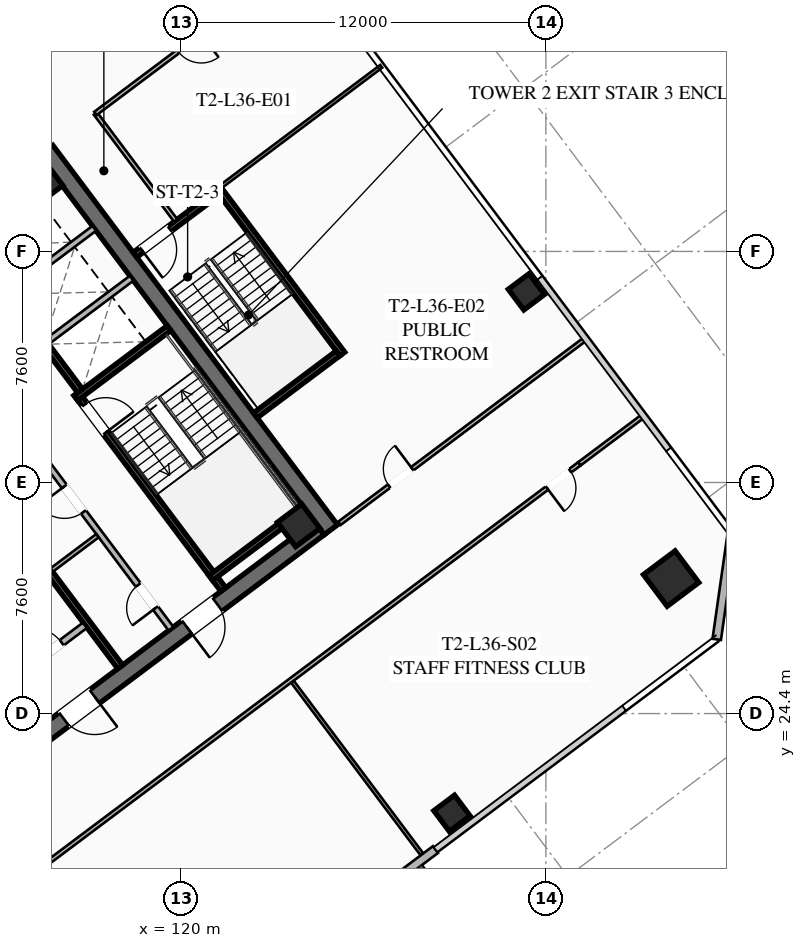
"""IFC4 building model, lengths in metres.
Left out: names, types, materials, properties, quantities, classifications, styles, units other than length and angle.
Written with IfcOpenShell. Run it as: python <this file> out.ifc"""

import sys

from ifc_helpers import new_model, si_unit, direction, frame, frame_2d, origin, origin_2d, place, context, subcontext, project, spatial, rectangle, hollow_rectangle, extrude, element, fill, save


model = new_model("IFC4")
c1 = context("Model", 3, precision=1e-05, world=origin(), true_north=direction((0.0, 1.0)))
c2 = subcontext(c1, "Body", "Model", "MODEL_VIEW")
j1 = project(units=[si_unit("LENGTHUNIT", "METRE"), si_unit("PLANEANGLEUNIT", "RADIAN")], contexts=[c1])
p1 = place(None, origin())
s1 = spatial("IfcSite", under=j1, at=p1, CompositionType="ELEMENT")
p2 = place(p1, origin())
s2 = spatial("IfcBuilding", under=s1, at=p2, CompositionType="ELEMENT")
p3 = place(p2, frame((0.0, 0.0, 135.7)))
s3 = spatial("IfcBuildingStorey", under=s2, at=p3, CompositionType="ELEMENT", Elevation=135.7)
p4 = place(p3, frame((115.564, 42.923, 0.0), z_axis=(0.0, 0.0, 1.0), x_axis=(0.600005007985, -0.799996243986, 0.0)))
e1 = element("IfcWall", 1, at=p4, inside=s3, PredefinedType="SHEAR", context=c2, shape_type="SweptSolid", body=[
    extrude(rectangle(XDim=15.6, YDim=0.55, at=frame_2d((7.8, 0.0))), origin(), (0.0, 0.0, 1.0), 3.55),
])
p5 = place(p3, frame((124.539, 30.498, 0.0), z_axis=(0.0, 0.0, 1.0), x_axis=(-0.799998054672, -0.600002593761, 0.0)))
e2 = element("IfcWall", 2, at=p5, inside=s3, PredefinedType="SHEAR", context=c2, shape_type="SweptSolid", body=[
    extrude(rectangle(XDim=15.06, YDim=0.55, at=frame_2d((7.53, 0.0))), origin(), (0.0, 0.0, 1.0), 3.55),
])
p6 = place(p5, frame((9.23, 0.0, 0.0)))
e3 = element("IfcOpeningElement", 3, at=p6, cuts=e2, PredefinedType="OPENING", context=c2, shape_type="SweptSolid", body=[
    extrude(rectangle(XDim=1.25, YDim=2.25, at=frame_2d((0.625, 1.125))), frame((0.0, 0.285, 0.0), z_axis=(0.0, -1.0, 0.0), x_axis=(1.0, 0.0, 0.0)), (0.0, 0.0, 1.0), 0.57),
])
p7 = place(p5, frame((4.18, 0.0, 0.0)))
e4 = element("IfcOpeningElement", 4, at=p7, cuts=e2, PredefinedType="OPENING", context=c2, shape_type="SweptSolid", body=[
    extrude(rectangle(XDim=1.25, YDim=2.25, at=frame_2d((0.625, 1.125))), frame((0.0, 0.285, 0.0), z_axis=(0.0, -1.0, 0.0), x_axis=(1.0, 0.0, 0.0)), (0.0, 0.0, 1.0), 0.57),
])
for number, where, z_axis, x_axis in (
    (5, (123.87, 30.59, 0.0), (0.0, 0.0, 1.0), (0.8, 0.6, 0.0)),
    (6, (115.41, 41.87, 0.0), (0.0, 0.0, 1.0), (0.8, 0.6, 0.0)),
):
    element("IfcColumn", number, at=place(p3, frame(where, z_axis=z_axis, x_axis=x_axis)), inside=s3, PredefinedType="COLUMN", context=c2, shape_type="SweptSolid", body=[
        extrude(hollow_rectangle(XDim=1.0, YDim=1.0, WallThickness=0.04, at=origin_2d()), origin(), (0.0, 0.0, 1.0), 3.37),
    ])
p8 = place(p3, frame((136.12, 28.84, 0.0), z_axis=(0.0, 0.0, 1.0), x_axis=(0.799999996291, 0.600000004945, 0.0)))
e7 = element("IfcColumn", 7, at=p8, inside=s3, PredefinedType="COLUMN", context=c2, shape_type="SweptSolid", body=[
    extrude(hollow_rectangle(XDim=1.3, YDim=1.3, WallThickness=0.05, at=origin_2d()), origin(), (0.0, 0.0, 1.0), 3.37),
])
for number, where, z_axis, x_axis in (
    (8, (128.91, 21.12, 0.0), (0.0, 0.0, 1.0), (0.8, 0.6, 0.0)),
    (9, (131.36, 38.27, 0.0), (0.0, 0.0, 1.0), (0.8, 0.6, 0.0)),
):
    element("IfcColumn", number, at=place(p3, frame(where, z_axis=z_axis, x_axis=x_axis)), inside=s3, PredefinedType="COLUMN", context=c2, shape_type="SweptSolid", body=[
        extrude(hollow_rectangle(XDim=0.85, YDim=0.85, WallThickness=0.035, at=origin_2d()), origin(), (0.0, 0.0, 1.0), 3.37),
    ])
p9 = place(p3, frame((128.368, 19.926, 0.0), z_axis=(0.0, 0.0, 1.0), x_axis=(-0.799986212866, -0.600018382406, 0.0)))
e10 = element("IfcWall", 10, at=p9, inside=s3, PredefinedType="SOLIDWALL", context=c2, shape_type="SweptSolid", body=[
    extrude(rectangle(XDim=8.5, YDim=0.28, at=frame_2d((4.25, 0.0))), origin(), (0.0, 0.0, 1.0), 3.37),
])
p10 = place(p9, frame((3.6, 0.0, 0.0)))
e11 = element("IfcOpeningElement", 11, at=p10, cuts=e10, PredefinedType="OPENING", context=c2, shape_type="SweptSolid", body=[
    extrude(rectangle(XDim=1.3, YDim=2.15, at=frame_2d((0.65, 1.075))), frame((0.0, 0.15, 0.0), z_axis=(0.0, -1.0, 0.0), x_axis=(1.0, 0.0, 0.0)), (0.0, 0.0, 1.0), 0.3),
])
p11 = place(p9, frame((1.46, 0.0, 0.85)))
e12 = element("IfcOpeningElement", 12, at=p11, cuts=e10, PredefinedType="OPENING", context=c2, shape_type="SweptSolid", body=[
    extrude(rectangle(XDim=1.8, YDim=1.92, at=frame_2d((0.9, 0.96))), frame((0.0, 0.15, 0.0), z_axis=(0.0, -1.0, 0.0), x_axis=(1.0, 0.0, 0.0)), (0.0, 0.0, 1.0), 0.3),
])
p12 = place(p3, frame((138.12, 30.34, 0.0), z_axis=(0.0, 0.0, 1.0), x_axis=(-0.141421356237, -0.989949493661, 0.0)))
e13 = element("IfcWall", 13, at=p12, inside=s3, PredefinedType="SOLIDWALL", context=c2, shape_type="SweptSolid", body=[
    extrude(rectangle(XDim=3.536, YDim=0.28, at=frame_2d((1.768, 0.0))), origin(), (0.0, 0.0, 1.0), 3.37),
])
p13 = place(p3, frame((116.56, 34.92, 0.0), z_axis=(0.0, 0.0, 1.0), x_axis=(0.59999029481, -0.8000072788, 0.0)))
e14 = element("IfcWall", 14, at=p13, inside=s3, PredefinedType="SHEAR", context=c2, shape_type="SweptSolid", body=[
    extrude(rectangle(XDim=8.05, YDim=0.2, at=frame_2d((4.025, 0.0))), origin(), (0.0, 0.0, 1.0), 3.37),
])
p14 = place(p13, frame((0.45, 0.0, 0.0)))
e15 = element("IfcOpeningElement", 15, at=p14, cuts=e14, PredefinedType="OPENING", context=c2, shape_type="SweptSolid", body=[
    extrude(rectangle(XDim=1.15, YDim=2.2, at=frame_2d((0.575, 1.1))), frame((0.0, 0.11, 0.0), z_axis=(0.0, -1.0, 0.0), x_axis=(1.0, 0.0, 0.0)), (0.0, 0.0, 1.0), 0.22),
])
for number, where, z_axis, x_axis in (
    (16, (116.54, 34.78, 0.0), (0.0, 0.0, 1.0), (0.8, 0.6, 0.0)),
    (17, (120.98, 28.86, 0.0), (0.0, 0.0, 1.0), (0.8, 0.6, 0.0)),
):
    element("IfcWall", number, at=place(p3, frame(where, z_axis=z_axis, x_axis=x_axis)), inside=s3, PredefinedType="SHEAR", context=c2, shape_type="SweptSolid", body=[
        extrude(rectangle(XDim=3.83, YDim=0.2, at=frame_2d((1.915, 0.0))), origin(), (0.0, 0.0, 1.0), 3.37),
    ])
p15 = place(p3, frame((117.998, 25.936, 0.0), z_axis=(0.0, 0.0, 1.0), x_axis=(-0.600002693989, 0.799997979501, 0.0)))
e18 = element("IfcWall", 18, at=p15, inside=s3, PredefinedType="SHEAR", context=c2, shape_type="SweptSolid", body=[
    extrude(rectangle(XDim=14.5, YDim=0.2, at=frame_2d((7.25, 0.0))), origin(), (0.0, 0.0, 1.0), 3.37),
])
p16 = place(p3, frame((114.316, 25.412, 0.0), z_axis=(0.0, 0.0, 1.0), x_axis=(0.800018601094, 0.59997519774, 0.0)))
e19 = element("IfcWall", 19, at=p16, inside=s3, PredefinedType="SOLIDWALL", context=c2, shape_type="SweptSolid", body=[
    extrude(rectangle(XDim=3.15, YDim=0.22, at=frame_2d((1.575, 0.0))), origin(), (0.0, 0.0, 1.0), 2.723),
])
p17 = place(p16, frame((0.95, 0.0, 0.0)))
e20 = element("IfcOpeningElement", 20, at=p17, cuts=e19, PredefinedType="OPENING", context=c2, shape_type="SweptSolid", body=[
    extrude(rectangle(XDim=1.25, YDim=2.25, at=frame_2d((0.625, 1.125))), frame((0.0, 0.12, 0.0), z_axis=(0.0, -1.0, 0.0), x_axis=(1.0, 0.0, 0.0)), (0.0, 0.0, 1.0), 0.24),
])
p18 = place(p3, frame((112.81, 40.17, 0.0), z_axis=(0.0, 0.0, 1.0), x_axis=(0.599993943644, -0.800004542231, 0.0)))
e21 = element("IfcWall", 21, at=p18, inside=s3, PredefinedType="SHEAR", context=c2, shape_type="SweptSolid", body=[
    extrude(rectangle(XDim=6.45, YDim=0.2, at=frame_2d((3.225, 0.0))), origin(), (0.0, 0.0, 1.0), 3.37),
])
for number, where, z_axis, x_axis in (
    (22, (115.59, 36.63, 0.0), (0.0, 0.0, 1.0), (0.8, 0.6, 0.0)),
    (23, (114.36, 38.27, 0.0), (0.0, 0.0, 1.0), (0.8, 0.6, 0.0)),
):
    element("IfcWall", number, at=place(p3, frame(where, z_axis=z_axis, x_axis=x_axis)), inside=s3, PredefinedType="SOLIDWALL", context=c2, shape_type="SweptSolid", body=[
        extrude(rectangle(XDim=3.48, YDim=0.2, at=frame_2d((1.74, 0.0))), origin(), (0.0, 0.0, 1.0), 3.37),
    ])
p19 = place(p3, frame((119.67, 27.19, 0.0), z_axis=(0.0, 0.0, 1.0), x_axis=(-0.599988677396, 0.800008491828, 0.0)))
e24 = element("IfcWall", 24, at=p19, inside=s3, PredefinedType="SOLIDWALL", context=c2, shape_type="SweptSolid", body=[
    extrude(rectangle(XDim=6.9, YDim=0.2, at=frame_2d((3.45, 0.0))), origin(), (0.0, 0.0, 1.0), 2.723),
])
p20 = place(p19, frame((0.85, 0.0, 0.0)))
e25 = element("IfcOpeningElement", 25, at=p20, cuts=e24, PredefinedType="OPENING", context=c2, shape_type="SweptSolid", body=[
    extrude(rectangle(XDim=0.95, YDim=2.05, at=frame_2d((0.475, 1.025))), frame((0.0, 0.11, 0.0), z_axis=(0.0, -1.0, 0.0), x_axis=(1.0, 0.0, 0.0)), (0.0, 0.0, 1.0), 0.22),
])
p21 = place(p19, frame((4.8, 0.0, 0.0)))
e26 = element("IfcOpeningElement", 26, at=p21, cuts=e24, PredefinedType="OPENING", context=c2, shape_type="SweptSolid", body=[
    extrude(rectangle(XDim=1.05, YDim=2.2, at=frame_2d((0.525, 1.1))), frame((0.0, 0.11, 0.0), z_axis=(0.0, -1.0, 0.0), x_axis=(1.0, 0.0, 0.0)), (0.0, 0.0, 1.0), 0.22),
])
p22 = place(p3, frame((115.746, 29.122, 0.0), z_axis=(0.0, 0.0, 1.0), x_axis=(0.8, 0.6, 0.0)))
e27 = element("IfcWall", 27, at=p22, inside=s3, PredefinedType="PARTITIONING", context=c2, shape_type="SweptSolid", body=[
    extrude(rectangle(XDim=1.88, YDim=0.135, at=frame_2d((0.94, 0.0))), origin(), (0.0, 0.0, 1.0), 2.723),
])
p23 = place(p3, frame((125.304, 36.228, 0.0), z_axis=(0.0, 0.0, 1.0), x_axis=(-0.59998851072, 0.800008616831, 0.0)))
e28 = element("IfcWall", 28, at=p23, inside=s3, PredefinedType="SHEAR", context=c2, shape_type="SweptSolid", body=[
    extrude(rectangle(XDim=6.8, YDim=0.2, at=frame_2d((3.4, 0.0))), origin(), (0.0, 0.0, 1.0), 3.37),
])
p24 = place(p3, frame((121.204, 41.528, 0.0), z_axis=(0.0, 0.0, 1.0), x_axis=(-0.800017232136, -0.599977023131, 0.0)))
e29 = element("IfcWall", 29, at=p24, inside=s3, PredefinedType="SHEAR", context=c2, shape_type="SweptSolid", body=[
    extrude(rectangle(XDim=3.4, YDim=0.2, at=frame_2d((1.7, 0.0))), origin(), (0.0, 0.0, 1.0), 3.37),
])
p25 = place(p24, frame((1.975, 0.0, 0.0)))
e30 = element("IfcOpeningElement", 30, at=p25, cuts=e29, PredefinedType="OPENING", context=c2, shape_type="SweptSolid", body=[
    extrude(rectangle(XDim=1.15, YDim=2.2, at=frame_2d((0.575, 1.1))), frame((0.0, 0.11, 0.0), z_axis=(0.0, -1.0, 0.0), x_axis=(1.0, 0.0, 0.0)), (0.0, 0.0, 1.0), 0.22),
])
p26 = place(p3, frame((122.444, 34.208, 0.0), z_axis=(0.0, 0.0, 1.0), x_axis=(0.79999138319, 0.600011488909, 0.0)))
e31 = element("IfcWall", 31, at=p26, inside=s3, PredefinedType="SHEAR", context=c2, shape_type="SweptSolid", body=[
    extrude(rectangle(XDim=3.4, YDim=0.2, at=frame_2d((1.7, 0.0))), origin(), (0.0, 0.0, 1.0), 3.37),
])
p27 = place(p3, frame((119.824, 40.618, 0.0), z_axis=(0.0, 0.0, 1.0), x_axis=(-0.599982243973, 0.800013316712, 0.0)))
e32 = element("IfcWall", 32, at=p27, inside=s3, PredefinedType="PARTITIONING", context=c2, shape_type="SweptSolid", body=[
    extrude(rectangle(XDim=4.4, YDim=0.135, at=frame_2d((2.2, 0.0))), origin(), (0.0, 0.0, 1.0), 2.723),
])
p28 = place(p3, frame((94.79, 31.53, 0.0), z_axis=(0.0, 0.0, 1.0), x_axis=(0.8, 0.6, 0.0)))
e33 = element("IfcWall", 33, at=p28, inside=s3, PredefinedType="PARTITIONING", context=c2, shape_type="SweptSolid", body=[
    extrude(rectangle(XDim=31.3, YDim=0.135, at=frame_2d((15.65, 0.0))), origin(), (0.0, 0.0, 1.0), 2.723),
])
p29 = place(p28, frame((0.3, 0.0, 0.0)))
e34 = element("IfcOpeningElement", 34, at=p29, cuts=e33, PredefinedType="OPENING", context=c2, shape_type="SweptSolid", body=[
    extrude(rectangle(XDim=0.95, YDim=2.05, at=frame_2d((0.475, 1.025))), frame((0.0, 0.077, 0.0), z_axis=(0.0, -1.0, 0.0), x_axis=(1.0, 0.0, 0.0)), (0.0, 0.0, 1.0), 0.155),
])
p30 = place(p28, frame((15.263, 0.0, 0.0)))
e35 = element("IfcOpeningElement", 35, at=p30, cuts=e33, PredefinedType="OPENING", context=c2, shape_type="SweptSolid", body=[
    extrude(rectangle(XDim=0.95, YDim=2.05, at=frame_2d((0.475, 1.025))), frame((0.0, 0.077, 0.0), z_axis=(0.0, -1.0, 0.0), x_axis=(1.0, 0.0, 0.0)), (0.0, 0.0, 1.0), 0.155),
])
p31 = place(p28, frame((30.05, 0.0, 0.0)))
e36 = element("IfcOpeningElement", 36, at=p31, cuts=e33, PredefinedType="OPENING", context=c2, shape_type="SweptSolid", body=[
    extrude(rectangle(XDim=0.95, YDim=2.05, at=frame_2d((0.475, 1.025))), frame((0.0, 0.077, 0.0), z_axis=(0.0, -1.0, 0.0), x_axis=(1.0, 0.0, 0.0)), (0.0, 0.0, 1.0), 0.155),
])
p32 = place(p3, frame((133.102, 32.614, 0.0), z_axis=(0.0, 0.0, 1.0), x_axis=(-0.8, -0.6, 0.0)))
e37 = element("IfcWall", 37, at=p32, inside=s3, PredefinedType="PARTITIONING", context=c2, shape_type="SweptSolid", body=[
    extrude(rectangle(XDim=31.3, YDim=0.135, at=frame_2d((15.65, 0.0))), origin(), (0.0, 0.0, 1.0), 2.723),
])
p33 = place(p32, frame((29.97, 0.0, 0.0)))
e38 = element("IfcOpeningElement", 38, at=p33, cuts=e37, PredefinedType="OPENING", context=c2, shape_type="SweptSolid", body=[
    extrude(rectangle(XDim=0.95, YDim=2.05, at=frame_2d((0.475, 1.025))), frame((0.0, 0.077, 0.0), z_axis=(0.0, -1.0, 0.0), x_axis=(1.0, 0.0, 0.0)), (0.0, 0.0, 1.0), 0.155),
])
p34 = place(p32, frame((0.38, 0.0, 0.0)))
e39 = element("IfcOpeningElement", 39, at=p34, cuts=e37, PredefinedType="OPENING", context=c2, shape_type="SweptSolid", body=[
    extrude(rectangle(XDim=0.95, YDim=2.05, at=frame_2d((0.475, 1.025))), frame((0.0, 0.077, 0.0), z_axis=(0.0, -1.0, 0.0), x_axis=(1.0, 0.0, 0.0)), (0.0, 0.0, 1.0), 0.155),
])
p35 = place(p3, frame((133.102, 32.614, 0.0), z_axis=(0.0, 0.0, 1.0), x_axis=(0.80002227902, 0.599970293491, 0.0)))
e40 = element("IfcWall", 40, at=p35, inside=s3, PredefinedType="PARTITIONING", context=c2, shape_type="SweptSolid", body=[
    extrude(rectangle(XDim=2.63, YDim=0.135, at=frame_2d((1.315, 0.0))), origin(), (0.0, 0.0, 1.0), 2.723),
])
p36 = place(p3, frame((127.918, 19.776, 0.0), z_axis=(0.0, 0.0, 1.0), x_axis=(-0.6, 0.8, 0.0)))
e41 = element("IfcWall", 41, at=p36, inside=s3, PredefinedType="PARTITIONING", context=c2, shape_type="SweptSolid", body=[
    extrude(rectangle(XDim=7.08, YDim=0.11, at=frame_2d((3.54, 0.0))), origin(), (0.0, 0.0, 1.0), 2.723),
])
p37 = place(p3, frame((123.944, 49.208, 0.0), z_axis=(0.0, 0.0, 1.0), x_axis=(-0.799996532921, -0.600004622744, 0.0)))
e42 = element("IfcWall", 42, at=p37, inside=s3, PredefinedType="PARTITIONING", context=c2, shape_type="SweptSolid", body=[
    extrude(rectangle(XDim=8.45, YDim=0.135, at=frame_2d((4.225, 0.0))), origin(), (0.0, 0.0, 1.0), 2.723),
])
p38 = place(p37, frame((4.1, 0.0, 0.0)))
e43 = element("IfcOpeningElement", 43, at=p38, cuts=e42, PredefinedType="OPENING", context=c2, shape_type="SweptSolid", body=[
    extrude(rectangle(XDim=0.95, YDim=2.05, at=frame_2d((0.475, 1.025))), frame((0.0, 0.077, 0.0), z_axis=(0.0, -1.0, 0.0), x_axis=(1.0, 0.0, 0.0)), (0.0, 0.0, 1.0), 0.155),
])
p39 = place(p3, frame((125.208, 30.656, 0.0), z_axis=(0.0, 0.0, 1.0), x_axis=(0.799997105034, 0.600003859935, 0.0)))
e44 = element("IfcWall", 44, at=p39, inside=s3, PredefinedType="PARTITIONING", context=c2, shape_type="SweptSolid", body=[
    extrude(rectangle(XDim=10.12, YDim=0.135, at=frame_2d((5.06, 0.0))), origin(), (0.0, 0.0, 1.0), 2.723),
])
p40 = place(p39, frame((2.045, 0.0, 0.0)))
e45 = element("IfcOpeningElement", 45, at=p40, cuts=e44, PredefinedType="OPENING", context=c2, shape_type="SweptSolid", body=[
    extrude(rectangle(XDim=0.95, YDim=2.05, at=frame_2d((0.475, 1.025))), frame((0.0, 0.077, 0.0), z_axis=(0.0, -1.0, 0.0), x_axis=(1.0, 0.0, 0.0)), (0.0, 0.0, 1.0), 0.155),
])
p41 = place(p3, frame((126.584, 45.688, 0.0), z_axis=(0.0, 0.0, 1.0), x_axis=(-0.800004438899, -0.599994081423, 0.0)))
e46 = element("IfcWall", 46, at=p41, inside=s3, PredefinedType="PARTITIONING", context=c2, shape_type="SweptSolid", body=[
    extrude(rectangle(XDim=6.6, YDim=0.11, at=frame_2d((3.3, 0.0))), origin(), (0.0, 0.0, 1.0), 2.723),
])
p42 = place(p6, origin())
e47 = element("IfcDoor", 47, at=p42, inside=s3, OperationType="SINGLE_SWING_LEFT", PredefinedType="DOOR", context=c2, shape_type="SweptSolid", body=[
    extrude(rectangle(XDim=1.25, YDim=2.25, at=frame_2d((0.625, 1.125))), frame((0.0, 0.025, 0.0), z_axis=(0.0, -1.0, 0.0), x_axis=(1.0, 0.0, 0.0)), (0.0, 0.0, 1.0), 0.05),
])
fill(e3, e47)
p43 = place(p7, origin())
e48 = element("IfcDoor", 48, at=p43, inside=s3, OperationType="SINGLE_SWING_RIGHT", PredefinedType="DOOR", context=c2, shape_type="SweptSolid", body=[
    extrude(rectangle(XDim=1.25, YDim=2.25, at=frame_2d((0.625, 1.125))), frame((0.0, 0.025, 0.0), z_axis=(0.0, -1.0, 0.0), x_axis=(1.0, 0.0, 0.0)), (0.0, 0.0, 1.0), 0.05),
])
fill(e4, e48)
p44 = place(p14, origin())
e49 = element("IfcDoor", 49, at=p44, inside=s3, OperationType="SINGLE_SWING_RIGHT", PredefinedType="DOOR", context=c2, shape_type="SweptSolid", body=[
    extrude(rectangle(XDim=1.15, YDim=2.2, at=frame_2d((0.575, 1.1))), frame((0.0, 0.025, 0.0), z_axis=(0.0, -1.0, 0.0), x_axis=(1.0, 0.0, 0.0)), (0.0, 0.0, 1.0), 0.05),
])
fill(e15, e49)
p45 = place(p17, origin())
e50 = element("IfcDoor", 50, at=p45, inside=s3, OperationType="SINGLE_SWING_LEFT", PredefinedType="DOOR", context=c2, shape_type="SweptSolid", body=[
    extrude(rectangle(XDim=1.25, YDim=2.25, at=frame_2d((0.625, 1.125))), frame((0.0, 0.025, 0.0), z_axis=(0.0, -1.0, 0.0), x_axis=(1.0, 0.0, 0.0)), (0.0, 0.0, 1.0), 0.05),
])
fill(e20, e50)
p46 = place(p20, origin())
e51 = element("IfcDoor", 51, at=p46, inside=s3, OperationType="SINGLE_SWING_LEFT", PredefinedType="DOOR", context=c2, shape_type="SweptSolid", body=[
    extrude(rectangle(XDim=0.95, YDim=2.05, at=frame_2d((0.475, 1.025))), frame((0.0, 0.025, 0.0), z_axis=(0.0, -1.0, 0.0), x_axis=(1.0, 0.0, 0.0)), (0.0, 0.0, 1.0), 0.05),
])
fill(e25, e51)
p47 = place(p21, origin())
e52 = element("IfcDoor", 52, at=p47, inside=s3, OperationType="SINGLE_SWING_RIGHT", PredefinedType="DOOR", context=c2, shape_type="SweptSolid", body=[
    extrude(rectangle(XDim=1.05, YDim=2.2, at=frame_2d((0.525, 1.1))), frame((0.0, 0.025, 0.0), z_axis=(0.0, -1.0, 0.0), x_axis=(1.0, 0.0, 0.0)), (0.0, 0.0, 1.0), 0.05),
])
fill(e26, e52)
p48 = place(p25, origin())
e53 = element("IfcDoor", 53, at=p48, inside=s3, OperationType="SINGLE_SWING_RIGHT", PredefinedType="DOOR", context=c2, shape_type="SweptSolid", body=[
    extrude(rectangle(XDim=1.15, YDim=2.2, at=frame_2d((0.575, 1.1))), frame((0.0, 0.025, 0.0), z_axis=(0.0, -1.0, 0.0), x_axis=(1.0, 0.0, 0.0)), (0.0, 0.0, 1.0), 0.05),
])
fill(e30, e53)
p49 = place(p34, origin())
e54 = element("IfcDoor", 54, at=p49, inside=s3, OperationType="SINGLE_SWING_RIGHT", PredefinedType="DOOR", context=c2, shape_type="SweptSolid", body=[
    extrude(rectangle(XDim=0.95, YDim=2.05, at=frame_2d((0.475, 1.025))), frame((0.0, 0.025, 0.0), z_axis=(0.0, -1.0, 0.0), x_axis=(1.0, 0.0, 0.0)), (0.0, 0.0, 1.0), 0.05),
])
fill(e39, e54)
p50 = place(p40, origin())
e55 = element("IfcDoor", 55, at=p50, inside=s3, OperationType="SINGLE_SWING_RIGHT", PredefinedType="DOOR", context=c2, shape_type="SweptSolid", body=[
    extrude(rectangle(XDim=0.95, YDim=2.05, at=frame_2d((0.475, 1.025))), frame((0.0, 0.025, 0.0), z_axis=(0.0, -1.0, 0.0), x_axis=(1.0, 0.0, 0.0)), (0.0, 0.0, 1.0), 0.05),
])
fill(e45, e55)
save(model, sys.argv[1])
